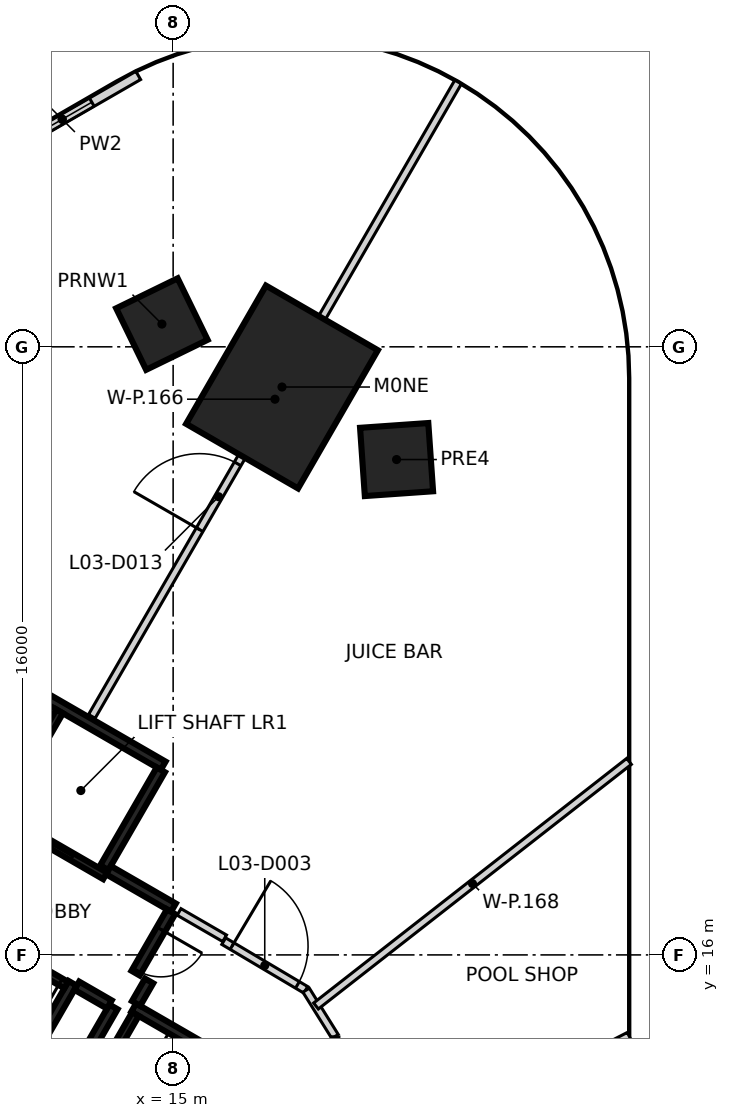
"""IFC4 building model, lengths in metres.
Left out: names, types, materials, properties, quantities, classifications, styles, units other than length and angle.
Written with IfcOpenShell. Run it as: python <this file> out.ifc"""

import sys

from ifc_helpers import new_model, si_unit, direction, frame, frame_2d, origin, origin_2d, place, context, subcontext, project, spatial, polyline, rectangle, outline, extrude, element, fill, save


model = new_model("IFC4")
c1 = context("Model", 3, precision=1e-05, world=origin(), true_north=direction((0.0, 1.0)))
c2 = subcontext(c1, "Body", "Model", "MODEL_VIEW")
j1 = project(units=[si_unit("LENGTHUNIT", "METRE"), si_unit("PLANEANGLEUNIT", "RADIAN")], contexts=[c1])
p1 = place(None, origin())
s1 = spatial("IfcSite", under=j1, at=p1, CompositionType="ELEMENT")
p2 = place(p1, origin())
s2 = spatial("IfcBuilding", under=s1, at=p2, CompositionType="ELEMENT")
p3 = place(p2, frame((0.0, 0.0, 19.5)))
s3 = spatial("IfcBuildingStorey", under=s2, at=p3, CompositionType="ELEMENT", Elevation=19.5)
p4 = place(p3, frame((17.865, 30.942, -0.35), z_axis=(0.0, 0.0, 1.0), x_axis=(0.5, 0.866025403784, 0.0)))
e1 = element("IfcColumn", 1, at=p4, inside=s3, PredefinedType="COLUMN", context=c2, shape_type="SweptSolid", body=[
    extrude(rectangle(XDim=4.2, YDim=3.4, at=origin_2d()), origin(), (0.0, 0.0, 1.0), 4.9),
])
for number, where, z_axis, x_axis in (
    (2, (20.879, 29.034, -0.35), (0.0, 0.0, 1.0), (0.998, 0.07, 0.0)),
    (3, (14.705, 32.599, -0.35), (0.0, 0.0, 1.0), (-0.438, 0.899, 0.0)),
):
    element("IfcColumn", number, at=place(p3, frame(where, z_axis=z_axis, x_axis=x_axis)), inside=s3, PredefinedType="COLUMN", context=c2, shape_type="SweptSolid", body=[
        extrude(rectangle(XDim=1.8, YDim=1.8, at=origin_2d()), origin(), (0.0, 0.0, 1.0), 2.5),
    ])
p5 = place(p3, origin())
e4 = element("IfcWall", 4, at=p5, inside=s3, PredefinedType="SOLIDWALL", context=c2, shape_type="SweptSolid", body=[
    extrude(outline(polyline([(27.0, 31.177), (26.981, 31.766), (26.827, 32.933), (26.522, 34.07), (26.072, 35.157), (25.483, 36.177), (24.767, 37.111), (23.934, 37.943), (23.479, 38.317), (22.5, 38.971), (21.444, 39.492), (20.329, 39.87), (19.175, 40.1), (18.0, 40.177), (16.825, 40.1), (16.244, 40.004), (15.107, 39.699), (14.019, 39.249), (14.115, 39.018), (15.188, 39.462), (16.297, 39.759), (16.854, 39.851), (18.0, 39.926), (19.142, 39.852), (20.265, 39.628), (21.348, 39.26), (22.375, 38.754), (23.33, 38.116), (23.766, 37.758), (24.578, 36.946), (25.275, 36.038), (25.847, 35.047), (26.285, 33.989), (26.581, 32.884), (26.731, 31.745), (26.75, 31.169), (27.0, 31.177)])), origin(), (0.0, 0.0, 1.0), 4.55),
])
p6 = place(p3, frame((10.08, 36.832, 0.0), z_axis=(0.0, 0.0, 1.0), x_axis=(0.866216377649, 0.499669077583, 0.0)))
e5 = element("IfcWall", 5, at=p6, inside=s3, PredefinedType="SOLIDWALL", context=c2, shape_type="SweptSolid", body=[
    extrude(rectangle(XDim=4.62, YDim=0.25, at=frame_2d((2.31, 0.0))), origin(), (0.0, 0.0, 1.0), 4.55),
])
p7 = place(p6, frame((1.41, 0.0, 1.1)))
e6 = element("IfcOpeningElement", 6, at=p7, cuts=e5, PredefinedType="OPENING", context=c2, shape_type="SweptSolid", body=[
    extrude(rectangle(XDim=1.8, YDim=1.5, at=frame_2d((0.9, 0.75))), frame((0.0, 0.135, 0.0), z_axis=(0.0, -1.0, 0.0), x_axis=(1.0, 0.0, 0.0)), (0.0, 0.0, 1.0), 0.27),
])
p8 = place(p3, frame((9.673, 23.903, 0.0), z_axis=(0.0, 0.0, 1.0), x_axis=(0.86603616409, -0.499981362141, 0.0)))
e7 = element("IfcWall", 7, at=p8, inside=s3, PredefinedType="SHEAR", context=c2, shape_type="SweptSolid", body=[
    extrude(rectangle(XDim=5.85, YDim=0.25, at=frame_2d((2.925, 0.0))), origin(), (0.0, 0.0, 1.0), 4.55),
])
p9 = place(p3, frame((12.357, 15.252, 0.0), z_axis=(0.0, 0.0, 1.0), x_axis=(-0.500028443584, -0.866008981251, 0.0)))
e8 = element("IfcWall", 8, at=p9, inside=s3, PredefinedType="SHEAR", context=c2, shape_type="SweptSolid", body=[
    extrude(rectangle(XDim=3.2, YDim=0.25, at=frame_2d((1.6, 0.0))), origin(), (0.0, 0.0, 1.0), 4.55),
])
p10 = place(p3, frame((14.676, 20.87, 0.0), z_axis=(0.0, 0.0, 1.0), x_axis=(-0.499987686533, -0.866032512851, 0.0)))
e9 = element("IfcWall", 9, at=p10, inside=s3, PredefinedType="SHEAR", context=c2, shape_type="SweptSolid", body=[
    extrude(rectangle(XDim=2.975, YDim=0.25, at=frame_2d((1.487, 0.0))), origin(), (0.0, 0.0, 1.0), 4.55),
])
p11 = place(p3, frame((13.963, 14.614, 0.0), z_axis=(0.0, 0.0, 1.0), x_axis=(0.866042235819, -0.499970844928, 0.0)))
e10 = element("IfcWall", 10, at=p11, inside=s3, PredefinedType="SHEAR", context=c2, shape_type="SweptSolid", body=[
    extrude(rectangle(XDim=2.865, YDim=0.25, at=frame_2d((1.432, 0.0))), origin(), (0.0, 0.0, 1.0), 4.55),
])
p12 = place(p3, frame((11.888, 11.961, 0.0), z_axis=(0.0, 0.0, 1.0), x_axis=(0.500003324108, 0.866023484601, 0.0)))
e11 = element("IfcWall", 11, at=p12, inside=s3, PredefinedType="SHEAR", context=c2, shape_type="SweptSolid", body=[
    extrude(rectangle(XDim=3.085, YDim=0.25, at=frame_2d((1.542, 0.0))), origin(), (0.0, 0.0, 1.0), 4.55),
])
p13 = place(p3, frame((13.297, 18.231, 0.0), z_axis=(0.0, 0.0, 1.0), x_axis=(0.866043531843, -0.499968599967, 0.0)))
e12 = element("IfcWall", 12, at=p13, inside=s3, PredefinedType="SHEAR", context=c2, shape_type="SweptSolid", body=[
    extrude(rectangle(XDim=1.975, YDim=0.25, at=frame_2d((0.987, 0.0))), origin(), (0.0, 0.0, 1.0), 4.55),
])
p14 = place(p3, frame((14.945, 17.135, 0.0), z_axis=(0.0, 0.0, 1.0), x_axis=(-0.499983108224, -0.866035156036, 0.0)))
e13 = element("IfcWall", 13, at=p14, inside=s3, PredefinedType="SHEAR", context=c2, shape_type="SweptSolid", body=[
    extrude(rectangle(XDim=1.865, YDim=0.25, at=frame_2d((0.932, 0.0))), origin(), (0.0, 0.0, 1.0), 4.55),
])
p15 = place(p14, frame((0.535, 0.0, 0.0)))
e14 = element("IfcOpeningElement", 14, at=p15, cuts=e13, PredefinedType="OPENING", context=c2, shape_type="SweptSolid", body=[
    extrude(rectangle(XDim=1.25, YDim=2.1, at=frame_2d((0.625, 1.05))), frame((0.0, 0.135, 0.0), z_axis=(0.0, -1.0, 0.0), x_axis=(1.0, 0.0, 0.0)), (0.0, 0.0, 1.0), 0.27),
])
p16 = place(p3, frame((13.322, 14.695, 0.0), z_axis=(0.0, 0.0, 1.0), x_axis=(-0.866017078145, 0.500014420154, 0.0)))
e15 = element("IfcWall", 15, at=p16, inside=s3, PredefinedType="SHEAR", context=c2, shape_type="SweptSolid", body=[
    extrude(rectangle(XDim=0.989, YDim=0.25, at=frame_2d((0.495, 0.0))), origin(), (0.0, 0.0, 1.0), 4.55),
])
p17 = place(p3, frame((14.368, 15.315, 0.0), z_axis=(0.0, 0.0, 1.0), x_axis=(-0.499897359611, -0.866084655132, 0.0)))
e16 = element("IfcWall", 16, at=p17, inside=s3, PredefinedType="SHEAR", context=c2, shape_type="SweptSolid", body=[
    extrude(rectangle(XDim=0.685, YDim=0.25, at=frame_2d((0.342, 0.0))), origin(), (0.0, 0.0, 1.0), 4.55),
])
p18 = place(p3, frame((13.21, 18.08, 0.0), z_axis=(0.0, 0.0, 1.0), x_axis=(-0.866030299012, 0.499991521122, 0.0)))
e17 = element("IfcWall", 17, at=p18, inside=s3, PredefinedType="SHEAR", context=c2, shape_type="SweptSolid", body=[
    extrude(rectangle(XDim=6.1, YDim=0.2, at=frame_2d((3.05, 0.0))), origin(), (0.0, 0.0, 1.0), 4.55),
])
p19 = place(p18, frame((1.0, 0.0, 0.0)))
e18 = element("IfcOpeningElement", 18, at=p19, cuts=e17, PredefinedType="OPENING", context=c2, shape_type="SweptSolid", body=[
    extrude(rectangle(XDim=1.2, YDim=2.1, at=frame_2d((0.6, 1.05))), frame((0.0, 0.11, 0.0), z_axis=(0.0, -1.0, 0.0), x_axis=(1.0, 0.0, 0.0)), (0.0, 0.0, 1.0), 0.22),
])
p20 = place(p18, frame((4.05, 0.0, 0.0)))
e19 = element("IfcOpeningElement", 19, at=p20, cuts=e17, PredefinedType="OPENING", context=c2, shape_type="SweptSolid", body=[
    extrude(rectangle(XDim=1.2, YDim=2.1, at=frame_2d((0.6, 1.05))), frame((0.0, 0.11, 0.0), z_axis=(0.0, -1.0, 0.0), x_axis=(1.0, 0.0, 0.0)), (0.0, 0.0, 1.0), 0.22),
])
p21 = place(p3, frame((12.185, 15.207, 0.0), z_axis=(0.0, 0.0, 1.0), x_axis=(-0.866020080793, 0.500009219579, 0.0)))
e20 = element("IfcWall", 20, at=p21, inside=s3, PredefinedType="SHEAR", context=c2, shape_type="SweptSolid", body=[
    extrude(rectangle(XDim=5.699, YDim=0.2, at=frame_2d((2.85, 0.0))), origin(), (0.0, 0.0, 1.0), 4.55),
])
p22 = place(p21, frame((0.174, 0.0, 0.0)))
e21 = element("IfcOpeningElement", 21, at=p22, cuts=e20, PredefinedType="OPENING", context=c2, shape_type="SweptSolid", body=[
    extrude(rectangle(XDim=0.9, YDim=2.1, at=frame_2d((0.45, 1.05))), frame((0.0, 0.11, 0.0), z_axis=(0.0, -1.0, 0.0), x_axis=(1.0, 0.0, 0.0)), (0.0, 0.0, 1.0), 0.22),
])
p23 = place(p21, frame((4.599, 0.0, 0.0)))
e22 = element("IfcOpeningElement", 22, at=p23, cuts=e20, PredefinedType="OPENING", context=c2, shape_type="SweptSolid", body=[
    extrude(rectangle(XDim=0.9, YDim=2.1, at=frame_2d((0.45, 1.05))), frame((0.0, 0.11, 0.0), z_axis=(0.0, -1.0, 0.0), x_axis=(1.0, 0.0, 0.0)), (0.0, 0.0, 1.0), 0.22),
])
p24 = place(p3, frame((10.489, 19.767, 0.0), z_axis=(0.0, 0.0, 1.0), x_axis=(0.499946628782, 0.866056215479, 0.0)))
e23 = element("IfcWall", 23, at=p24, inside=s3, PredefinedType="SHEAR", context=c2, shape_type="SweptSolid", body=[
    extrude(rectangle(XDim=3.048, YDim=0.2, at=frame_2d((1.524, 0.0))), origin(), (0.0, 0.0, 1.0), 4.55),
])
p25 = place(p3, frame((14.008, 14.442, 0.0), z_axis=(0.0, 0.0, 1.0), x_axis=(-0.499986818241, -0.866033014143, 0.0)))
e24 = element("IfcWall", 24, at=p25, inside=s3, PredefinedType="SHEAR", context=c2, shape_type="SweptSolid", body=[
    extrude(rectangle(XDim=2.798, YDim=0.2, at=frame_2d((1.399, 0.0))), origin(), (0.0, 0.0, 1.0), 4.55),
])
p26 = place(p25, frame((0.949, 0.0, 0.0)))
e25 = element("IfcOpeningElement", 25, at=p26, cuts=e24, PredefinedType="OPENING", context=c2, shape_type="SweptSolid", body=[
    extrude(rectangle(XDim=0.9, YDim=2.1, at=frame_2d((0.45, 1.05))), frame((0.0, 0.11, 0.0), z_axis=(0.0, -1.0, 0.0), x_axis=(1.0, 0.0, 0.0)), (0.0, 0.0, 1.0), 0.22),
])
p27 = place(p3, frame((15.156, 17.131, 0.0), z_axis=(0.0, 0.0, 1.0), x_axis=(0.865639364436, -0.500668044455, 0.0)))
e26 = element("IfcWall", 26, at=p27, inside=s3, PredefinedType="PARTITIONING", context=c2, shape_type="SweptSolid", body=[
    extrude(rectangle(XDim=1.385, YDim=0.2, at=frame_2d((0.693, 0.0))), origin(), (0.0, 0.0, 1.0), 4.55),
])
p28 = place(p3, frame((16.331, 16.362, 0.0), z_axis=(0.0, 0.0, 1.0), x_axis=(0.860005465563, -0.510284821645, 0.0)))
e27 = element("IfcWall", 27, at=p28, inside=s3, PredefinedType="PARTITIONING", context=c2, shape_type="SweptSolid", body=[
    extrude(rectangle(XDim=2.51, YDim=0.2, at=frame_2d((1.255, 0.0))), origin(), (0.0, 0.0, 1.0), 4.55),
])
p29 = place(p28, frame((0.255, 0.0, 0.0)))
e28 = element("IfcOpeningElement", 28, at=p29, cuts=e27, PredefinedType="OPENING", context=c2, shape_type="SweptSolid", body=[
    extrude(rectangle(XDim=2.0, YDim=2.1, at=frame_2d((1.0, 1.05))), frame((0.0, 0.11, 0.0), z_axis=(0.0, -1.0, 0.0), x_axis=(1.0, 0.0, 0.0)), (0.0, 0.0, 1.0), 0.22),
])
p30 = place(p3, frame((18.499, 15.072, 0.0), z_axis=(0.0, 0.0, 1.0), x_axis=(0.529616815535, -0.848237012104, 0.0)))
e29 = element("IfcWall", 29, at=p30, inside=s3, PredefinedType="PARTITIONING", context=c2, shape_type="SweptSolid", body=[
    extrude(rectangle(XDim=1.436, YDim=0.2, at=frame_2d((0.718, 0.0))), origin(), (0.0, 0.0, 1.0), 4.55),
])
p31 = place(p3, frame((19.214, 12.385, 0.0), z_axis=(0.0, 0.0, 1.0), x_axis=(0.032802164331, 0.999461864213, 0.0)))
e30 = element("IfcWall", 30, at=p31, inside=s3, PredefinedType="PARTITIONING", context=c2, shape_type="SweptSolid", body=[
    extrude(rectangle(XDim=1.459, YDim=0.2, at=frame_2d((0.729, 0.0))), origin(), (0.0, 0.0, 1.0), 4.55),
])
p32 = place(p3, frame((12.861, 22.276, 0.0), z_axis=(0.0, 0.0, 1.0), x_axis=(0.499989278408, 0.86603159381, 0.0)))
e31 = element("IfcWall", 31, at=p32, inside=s3, PredefinedType="PARTITIONING", context=c2, shape_type="SweptSolid", body=[
    extrude(rectangle(XDim=19.273, YDim=0.2, at=frame_2d((9.636, 0.0))), origin(), (0.0, 0.0, 1.0), 4.55),
])
p33 = place(p32, frame((5.673, 0.0, 0.0)))
e32 = element("IfcOpeningElement", 32, at=p33, cuts=e31, PredefinedType="OPENING", context=c2, shape_type="SweptSolid", body=[
    extrude(rectangle(XDim=2.0, YDim=2.1, at=frame_2d((1.0, 1.05))), frame((0.0, 0.11, 0.0), z_axis=(0.0, -1.0, 0.0), x_axis=(1.0, 0.0, 0.0)), (0.0, 0.0, 1.0), 0.22),
])
p34 = place(p3, frame((17.103, 8.787, 0.0), z_axis=(0.0, 0.0, 1.0), x_axis=(0.889456094774, 0.457020629151, 0.0)))
e33 = element("IfcWall", 33, at=p34, inside=s3, PredefinedType="PARTITIONING", context=c2, shape_type="SweptSolid", body=[
    extrude(rectangle(XDim=11.122, YDim=0.2, at=frame_2d((5.561, 0.0))), origin(), (0.0, 0.0, 1.0), 2.15),
])
p35 = place(p3, frame((18.759, 14.656, 0.0), z_axis=(0.0, 0.0, 1.0), x_axis=(0.787985777089, 0.615693442474, 0.0)))
e34 = element("IfcWall", 34, at=p35, inside=s3, PredefinedType="PARTITIONING", context=c2, shape_type="SweptSolid", body=[
    extrude(rectangle(XDim=10.453, YDim=0.2, at=frame_2d((5.227, 0.0))), origin(), (0.0, 0.0, 1.0), 2.15),
])
p36 = place(p7, origin())
e35 = element("IfcWindow", 35, at=p36, inside=s3, PartitioningType="SINGLE_PANEL", PredefinedType="WINDOW", context=c2, shape_type="SweptSolid", body=[
    extrude(rectangle(XDim=1.8, YDim=1.5, at=frame_2d((0.9, 0.75))), frame((0.0, 0.03, 0.0), z_axis=(0.0, -1.0, 0.0), x_axis=(1.0, 0.0, 0.0)), (0.0, 0.0, 1.0), 0.06),
])
fill(e6, e35)
p37 = place(p19, origin())
e36 = element("IfcDoor", 36, at=p37, inside=s3, OperationType="DOUBLE_DOOR_SLIDING", PredefinedType="DOOR", context=c2, shape_type="SweptSolid", body=[
    extrude(rectangle(XDim=1.2, YDim=2.1, at=frame_2d((0.6, 1.05))), frame((0.0, 0.025, 0.0), z_axis=(0.0, -1.0, 0.0), x_axis=(1.0, 0.0, 0.0)), (0.0, 0.0, 1.0), 0.05),
])
fill(e18, e36)
p38 = place(p15, origin())
e37 = element("IfcDoor", 37, at=p38, inside=s3, OperationType="SINGLE_SWING_LEFT", PredefinedType="DOOR", context=c2, shape_type="SweptSolid", body=[
    extrude(rectangle(XDim=1.25, YDim=2.1, at=frame_2d((0.625, 1.05))), frame((0.0, 0.025, 0.0), z_axis=(0.0, -1.0, 0.0), x_axis=(1.0, 0.0, 0.0)), (0.0, 0.0, 1.0), 0.05),
])
fill(e14, e37)
p39 = place(p22, origin())
e38 = element("IfcDoor", 38, at=p39, inside=s3, OperationType="SINGLE_SWING_LEFT", PredefinedType="DOOR", context=c2, shape_type="SweptSolid", body=[
    extrude(rectangle(XDim=0.9, YDim=2.1, at=frame_2d((0.45, 1.05))), frame((0.0, 0.025, 0.0), z_axis=(0.0, -1.0, 0.0), x_axis=(1.0, 0.0, 0.0)), (0.0, 0.0, 1.0), 0.05),
])
fill(e21, e38)
p40 = place(p29, origin())
e39 = element("IfcDoor", 39, at=p40, inside=s3, OperationType="DOUBLE_DOOR_SINGLE_SWING", PredefinedType="DOOR", context=c2, shape_type="SweptSolid", body=[
    extrude(rectangle(XDim=2.0, YDim=2.1, at=frame_2d((1.0, 1.05))), frame((0.0, 0.025, 0.0), z_axis=(0.0, -1.0, 0.0), x_axis=(1.0, 0.0, 0.0)), (0.0, 0.0, 1.0), 0.05),
])
fill(e28, e39)
p41 = place(p33, frame((2.0, 0.0, 0.0), z_axis=(0.0, 0.0, 1.0), x_axis=(-1.0, 0.0, 0.0)))
e40 = element("IfcDoor", 40, at=p41, inside=s3, OperationType="DOUBLE_DOOR_SINGLE_SWING", PredefinedType="DOOR", context=c2, shape_type="SweptSolid", body=[
    extrude(rectangle(XDim=2.0, YDim=2.1, at=frame_2d((1.0, 1.05))), frame((0.0, 0.025, 0.0), z_axis=(0.0, -1.0, 0.0), x_axis=(1.0, 0.0, 0.0)), (0.0, 0.0, 1.0), 0.05),
])
fill(e32, e40)
save(model, sys.argv[1])
